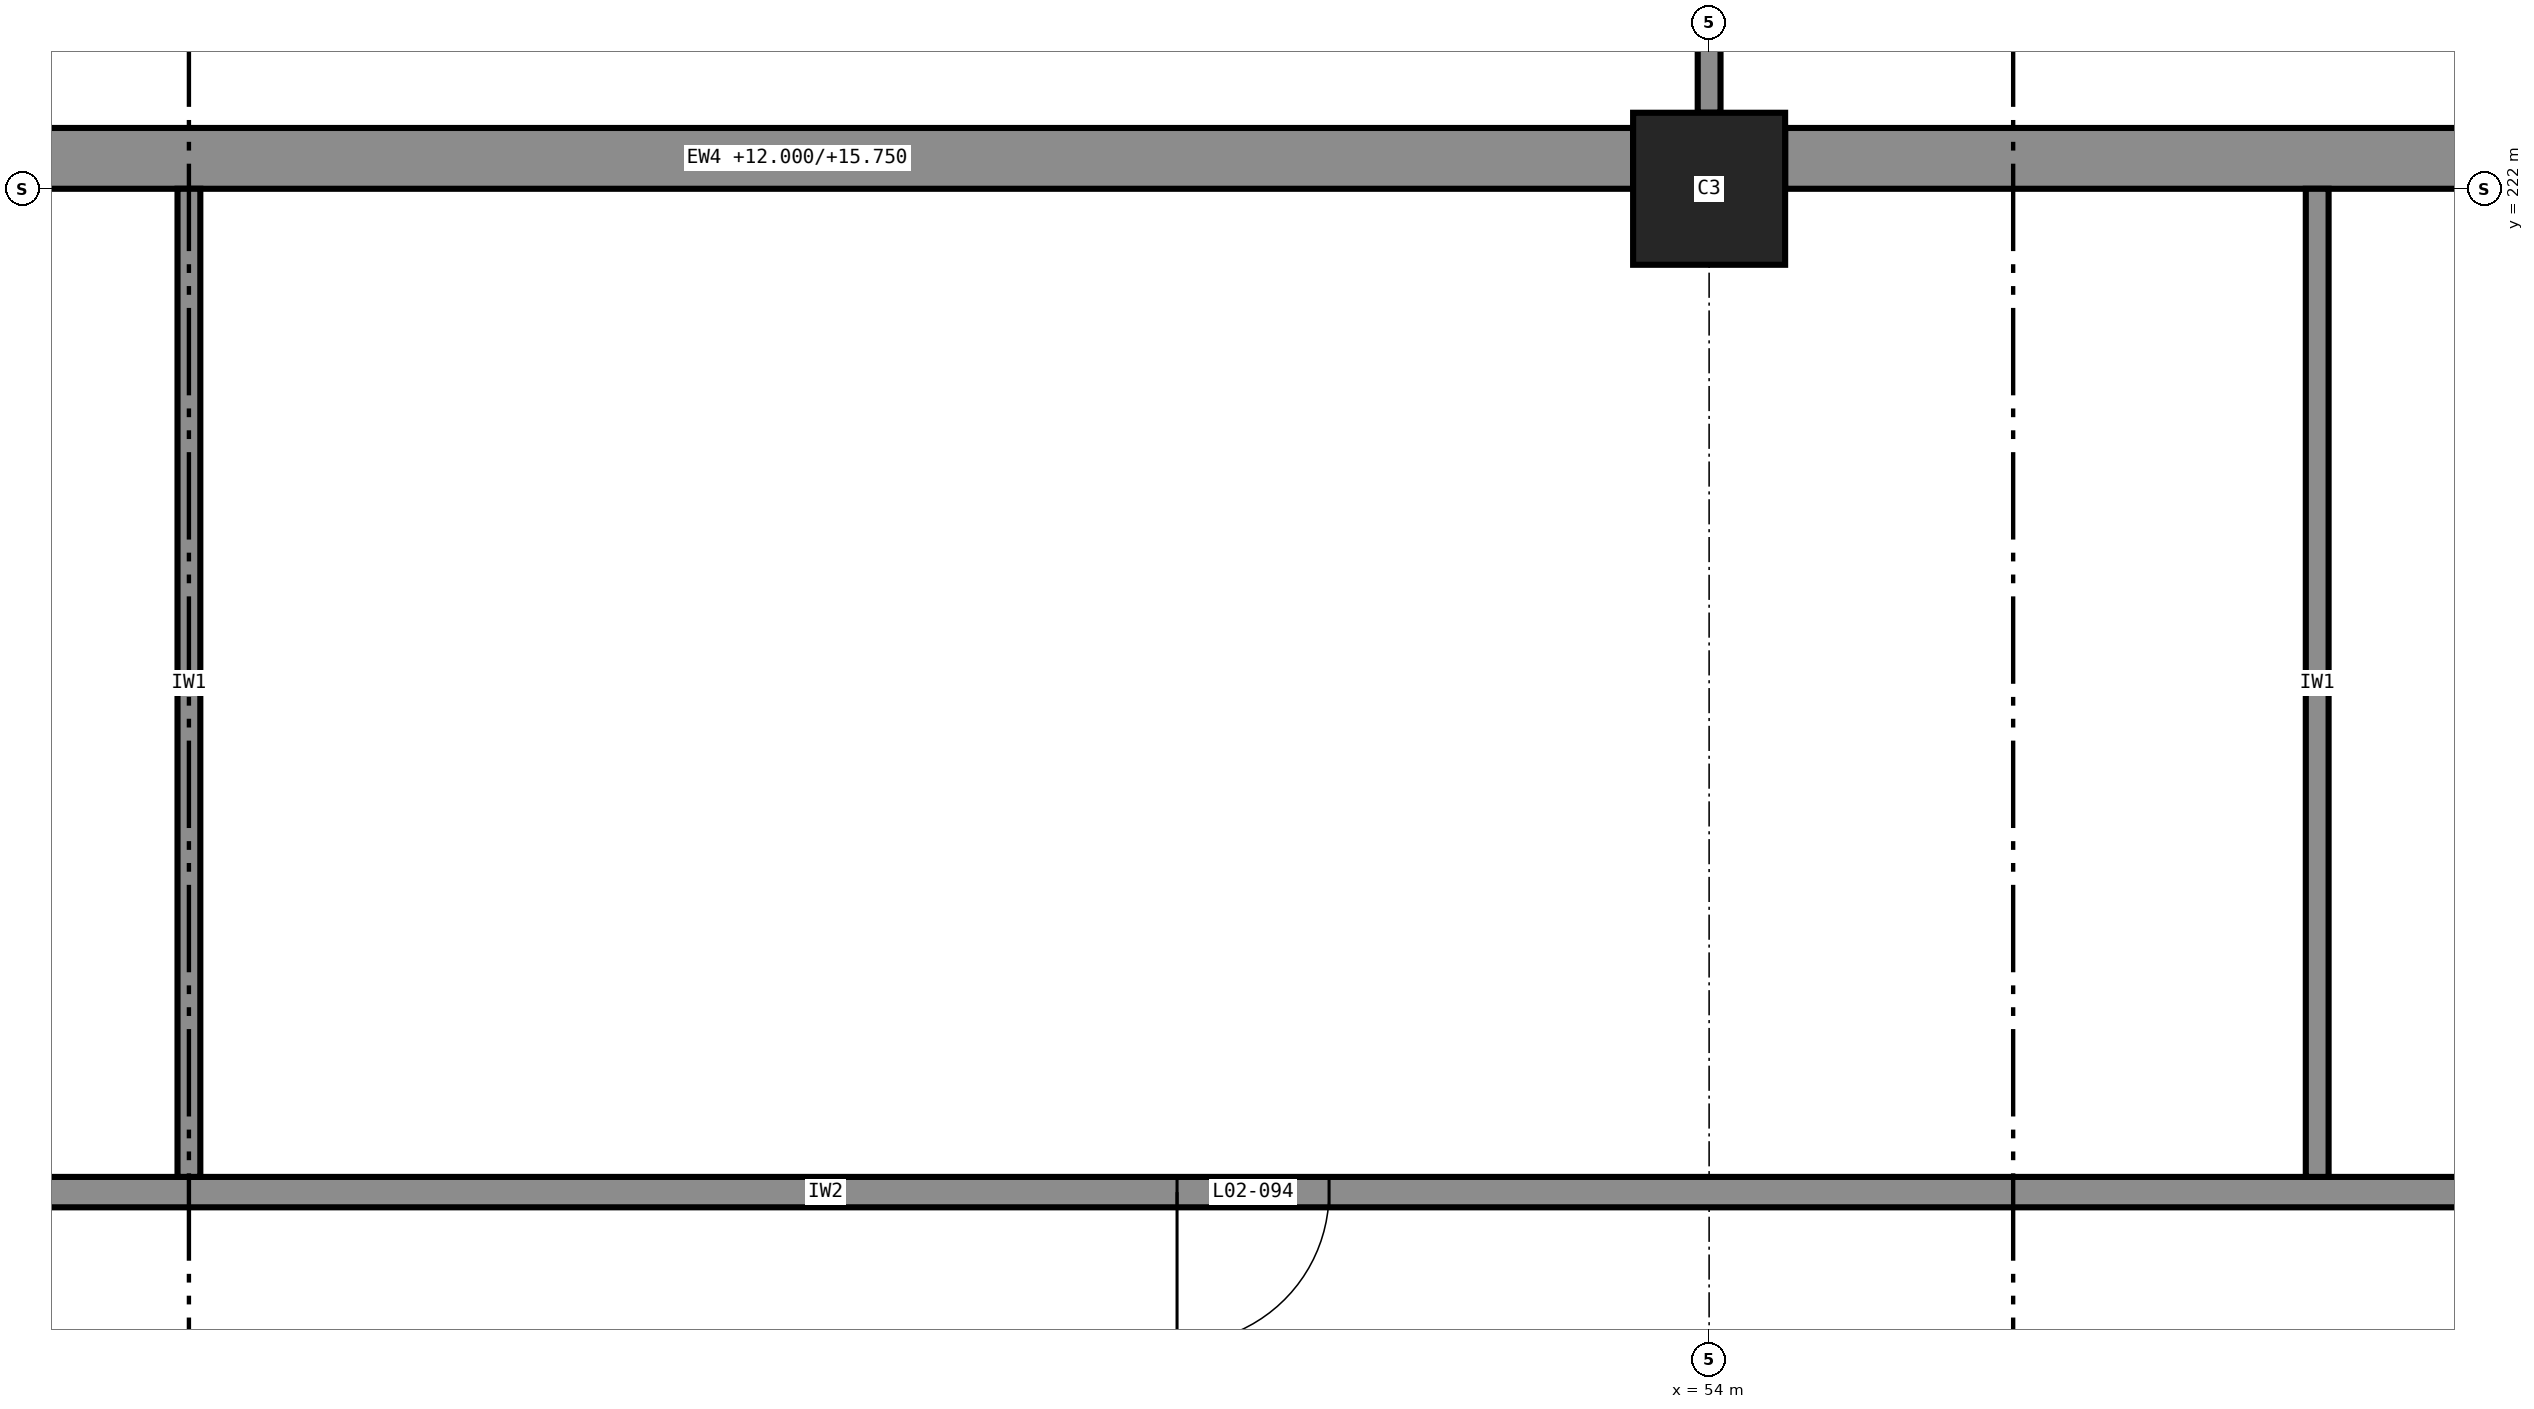
"""IFC4 building model, lengths in metres.
Left out: names, types, materials, properties, quantities, classifications, styles, units other than length and angle.
Written with IfcOpenShell. Run it as: python <this file> out.ifc"""

import sys

from ifc_helpers import new_model, si_unit, direction, frame, frame_2d, origin, origin_2d, place, context, subcontext, project, spatial, rectangle, extrude, element, fill, save


model = new_model("IFC4")
c1 = context("Model", 3, precision=1e-05, world=origin(), true_north=direction((0.0, 1.0)))
c2 = subcontext(c1, "Body", "Model", "MODEL_VIEW")
j1 = project(units=[si_unit("LENGTHUNIT", "METRE"), si_unit("PLANEANGLEUNIT", "RADIAN")], contexts=[c1])
p1 = place(None, origin())
s1 = spatial("IfcSite", under=j1, at=p1, CompositionType="ELEMENT")
p2 = place(p1, origin())
s2 = spatial("IfcBuilding", under=s1, at=p2, CompositionType="ELEMENT")
p3 = place(p2, frame((0.0, 0.0, 12.0)))
s3 = spatial("IfcBuildingStorey", under=s2, at=p3, CompositionType="ELEMENT", Elevation=12.0)
p4 = place(p3, frame((54.0, 222.0, 0.0), z_axis=(0.0, 0.0, 1.0), x_axis=(1.0, 0.0, 0.0)))
e1 = element("IfcColumn", 1, at=p4, inside=s3, PredefinedType="COLUMN", context=c2, shape_type="SweptSolid", body=[
    extrude(rectangle(XDim=1.0, YDim=1.0, at=origin_2d()), origin(), (0.0, 0.0, 1.0), 5.0),
])
for number, where, z_axis, x_axis in (
    (2, (42.5, 222.2, 0.0), (0.0, 0.0, 1.0), (1.0, 0.0, 0.0)),
    (3, (54.5, 222.2, 0.0), (0.0, 0.0, 1.0), (1.0, 0.0, 0.0)),
):
    element("IfcWall", number, at=place(p3, frame(where, z_axis=z_axis, x_axis=x_axis)), inside=s3, PredefinedType="SOLIDWALL", context=c2, shape_type="SweptSolid", body=[
        extrude(rectangle(XDim=11.0, YDim=0.4, at=frame_2d((5.5, 0.0))), origin(), (0.0, 0.0, 1.0), 3.75),
    ])
p5 = place(p3, frame((30.6, 215.4, 0.0), z_axis=(0.0, 0.0, 1.0), x_axis=(1.0, 0.0, 0.0)))
e4 = element("IfcWall", 4, at=p5, inside=s3, PredefinedType="PARTITIONING", context=c2, shape_type="SweptSolid", body=[
    extrude(rectangle(XDim=41.5, YDim=0.2, at=frame_2d((20.75, 0.0))), origin(), (0.0, 0.0, 1.0), 4.825),
])
p6 = place(p5, frame((5.9, 0.0, 0.0)))
e5 = element("IfcOpeningElement", 5, at=p6, cuts=e4, PredefinedType="OPENING", context=c2, shape_type="SweptSolid", body=[
    extrude(rectangle(XDim=1.0, YDim=2.1, at=frame_2d((0.5, 1.05))), frame((0.0, 0.11, 0.0), z_axis=(0.0, -1.0, 0.0), x_axis=(1.0, 0.0, 0.0)), (0.0, 0.0, 1.0), 0.22),
])
p7 = place(p5, frame((19.9, 0.0, 0.0)))
e6 = element("IfcOpeningElement", 6, at=p7, cuts=e4, PredefinedType="OPENING", context=c2, shape_type="SweptSolid", body=[
    extrude(rectangle(XDim=1.0, YDim=2.1, at=frame_2d((0.5, 1.05))), frame((0.0, 0.11, 0.0), z_axis=(0.0, -1.0, 0.0), x_axis=(1.0, 0.0, 0.0)), (0.0, 0.0, 1.0), 0.22),
])
p8 = place(p5, frame((33.9, 0.0, 0.0)))
e7 = element("IfcOpeningElement", 7, at=p8, cuts=e4, PredefinedType="OPENING", context=c2, shape_type="SweptSolid", body=[
    extrude(rectangle(XDim=1.0, YDim=2.1, at=frame_2d((0.5, 1.05))), frame((0.0, 0.11, 0.0), z_axis=(0.0, -1.0, 0.0), x_axis=(1.0, 0.0, 0.0)), (0.0, 0.0, 1.0), 0.22),
])
for number, where, z_axis, x_axis in (
    (8, (44.0, 215.5, 0.0), (0.0, 0.0, 1.0), (0.0, 1.0, 0.0)),
    (9, (58.0, 215.5, 0.0), (0.0, 0.0, 1.0), (0.0, 1.0, 0.0)),
):
    element("IfcWall", number, at=place(p3, frame(where, z_axis=z_axis, x_axis=x_axis)), inside=s3, PredefinedType="PARTITIONING", context=c2, shape_type="SweptSolid", body=[
        extrude(rectangle(XDim=6.5, YDim=0.15, at=frame_2d((3.25, 0.0))), origin(), (0.0, 0.0, 1.0), 4.825),
    ])
p9 = place(p3, frame((54.0, 222.5, 0.0), z_axis=(0.0, 0.0, 1.0), x_axis=(0.0, 1.0, 0.0)))
e10 = element("IfcWall", 10, at=p9, inside=s3, PredefinedType="PARTITIONING", context=c2, shape_type="SweptSolid", body=[
    extrude(rectangle(XDim=7.125, YDim=0.15, at=frame_2d((3.562, 0.0))), origin(), (0.0, 0.0, 1.0), 3.75),
])
p10 = place(p7, frame((1.0, 0.0, 0.0), z_axis=(0.0, 0.0, 1.0), x_axis=(-1.0, 0.0, 0.0)))
e11 = element("IfcDoor", 11, at=p10, inside=s3, OperationType="SINGLE_SWING_LEFT", PredefinedType="DOOR", context=c2, shape_type="SweptSolid", body=[
    extrude(rectangle(XDim=1.0, YDim=2.1, at=frame_2d((0.5, 1.05))), frame((0.0, 0.025, 0.0), z_axis=(0.0, -1.0, 0.0), x_axis=(1.0, 0.0, 0.0)), (0.0, 0.0, 1.0), 0.05),
])
fill(e6, e11)
save(model, sys.argv[1])
